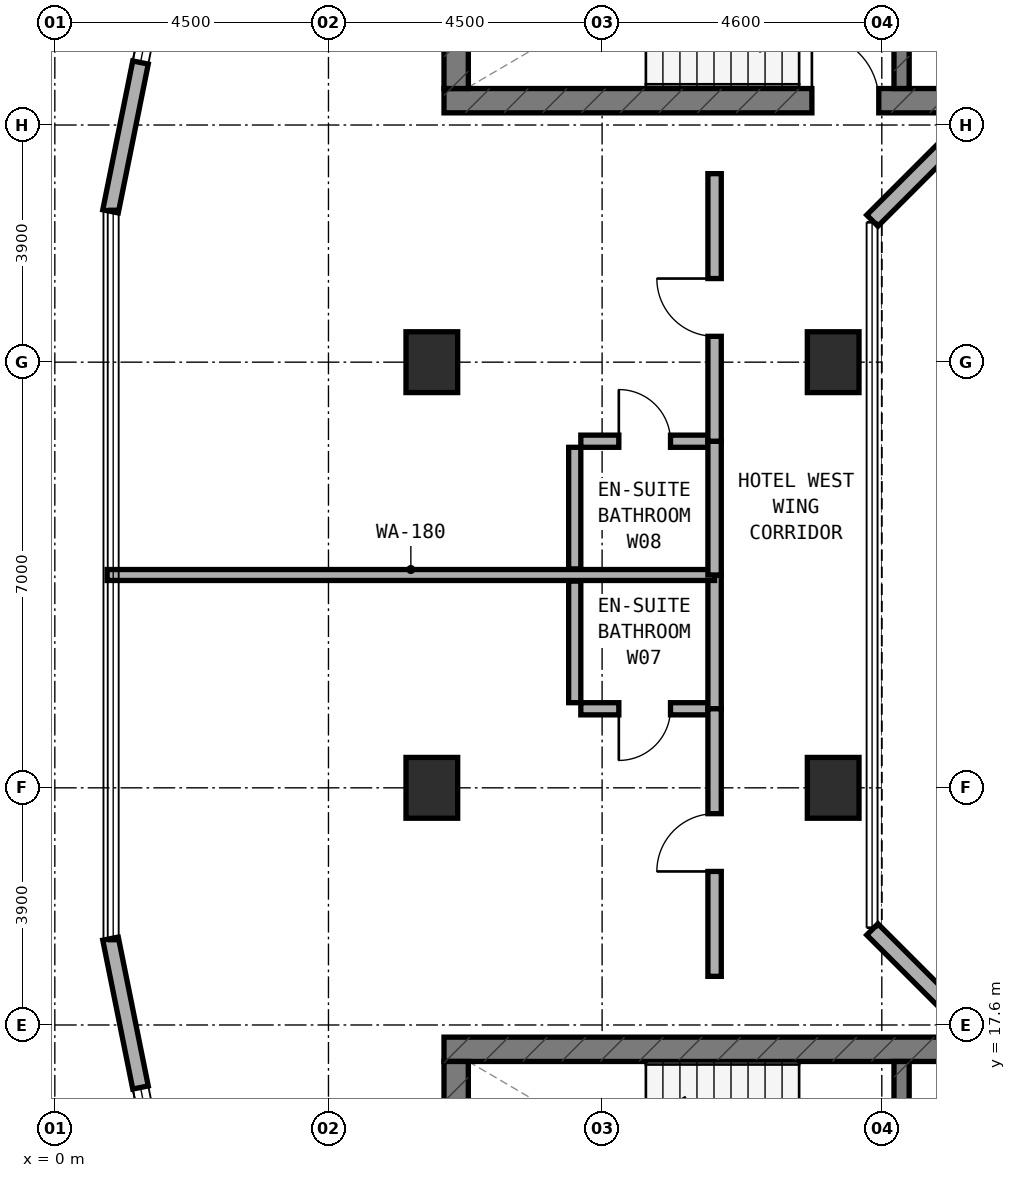
"""IFC4 building model, lengths in metres.
Left out: names, types, materials, properties, quantities, classifications, styles, units other than length and angle.
Written with IfcOpenShell. Run it as: python <this file> out.ifc"""

import sys

from ifc_helpers import new_model, si_unit, direction, frame, frame_2d, origin, origin_2d, place, context, subcontext, project, spatial, rectangle, extrude, element, fill, save


model = new_model("IFC4")
c1 = context("Model", 3, precision=1e-05, world=origin(), true_north=direction((0.0, 1.0)))
c2 = subcontext(c1, "Body", "Model", "MODEL_VIEW")
j1 = project(units=[si_unit("LENGTHUNIT", "METRE"), si_unit("PLANEANGLEUNIT", "RADIAN")], contexts=[c1])
p1 = place(None, origin())
s1 = spatial("IfcSite", under=j1, at=p1, CompositionType="ELEMENT")
p2 = place(p1, origin())
s2 = spatial("IfcBuilding", under=s1, at=p2, CompositionType="ELEMENT")
p3 = place(p2, frame((0.0, 0.0, 116.0)))
s3 = spatial("IfcBuildingStorey", under=s2, at=p3, CompositionType="ELEMENT", Elevation=116.0)
p4 = place(p3, frame((6.4, 32.8, 0.0), z_axis=(0.0, 0.0, 1.0), x_axis=(1.0, 0.0, 0.0)))
e1 = element("IfcWall", 1, at=p4, inside=s3, PredefinedType="SHEAR", context=c2, shape_type="SweptSolid", body=[
    extrude(rectangle(XDim=24.4, YDim=0.4, at=frame_2d((12.2, 0.0))), origin(), (0.0, 0.0, 1.0), 3.5),
])
p5 = place(p4, frame((6.05, 0.0, 0.0)))
e2 = element("IfcOpeningElement", 2, at=p5, cuts=e1, PredefinedType="OPENING", context=c2, shape_type="SweptSolid", body=[
    extrude(rectangle(XDim=1.1, YDim=2.15, at=frame_2d((0.55, 1.075))), frame((0.0, 0.21, 0.0), z_axis=(0.0, -1.0, 0.0), x_axis=(1.0, 0.0, 0.0)), (0.0, 0.0, 1.0), 0.42),
])
p6 = place(p3, frame((6.6, 33.0, 0.0), z_axis=(0.0, 0.0, 1.0), x_axis=(0.0, 1.0, 0.0)))
e3 = element("IfcWall", 3, at=p6, inside=s3, PredefinedType="SHEAR", context=c2, shape_type="SweptSolid", body=[
    extrude(rectangle(XDim=3.16, YDim=0.4, at=frame_2d((1.58, 0.0))), origin(), (0.0, 0.0, 1.0), 3.5),
])
p7 = place(p3, frame((13.925, 33.0, 0.0), z_axis=(0.0, 0.0, 1.0), x_axis=(0.0, 1.0, 0.0)))
e4 = element("IfcWall", 4, at=p7, inside=s3, PredefinedType="STANDARD", context=c2, shape_type="SweptSolid", body=[
    extrude(rectangle(XDim=3.16, YDim=0.25, at=frame_2d((1.58, 0.0))), origin(), (0.0, 0.0, 1.0), 3.18),
])
p8 = place(p7, frame((0.98, 0.0, 0.0)))
e5 = element("IfcOpeningElement", 5, at=p8, cuts=e4, PredefinedType="OPENING", context=c2, shape_type="SweptSolid", body=[
    extrude(rectangle(XDim=1.1, YDim=2.15, at=frame_2d((0.55, 1.075))), frame((0.0, 0.135, 0.0), z_axis=(0.0, -1.0, 0.0), x_axis=(1.0, 0.0, 0.0)), (0.0, 0.0, 1.0), 0.27),
])
p9 = place(p3, frame((6.4, 17.2, 0.0), z_axis=(0.0, 0.0, 1.0), x_axis=(1.0, 0.0, 0.0)))
e6 = element("IfcWall", 6, at=p9, inside=s3, PredefinedType="SHEAR", context=c2, shape_type="SweptSolid", body=[
    extrude(rectangle(XDim=24.4, YDim=0.4, at=frame_2d((12.2, 0.0))), origin(), (0.0, 0.0, 1.0), 3.5),
])
p10 = place(p3, frame((6.6, 13.84, 0.0), z_axis=(0.0, 0.0, 1.0), x_axis=(0.0, 1.0, 0.0)))
e7 = element("IfcWall", 7, at=p10, inside=s3, PredefinedType="SHEAR", context=c2, shape_type="SweptSolid", body=[
    extrude(rectangle(XDim=3.16, YDim=0.4, at=frame_2d((1.58, 0.0))), origin(), (0.0, 0.0, 1.0), 3.5),
])
p11 = place(p3, frame((13.925, 13.84, 0.0), z_axis=(0.0, 0.0, 1.0), x_axis=(0.0, 1.0, 0.0)))
e8 = element("IfcWall", 8, at=p11, inside=s3, PredefinedType="STANDARD", context=c2, shape_type="SweptSolid", body=[
    extrude(rectangle(XDim=3.16, YDim=0.25, at=frame_2d((1.58, 0.0))), origin(), (0.0, 0.0, 1.0), 3.18),
])
p12 = place(p11, frame((0.98, 0.0, 0.0)))
e9 = element("IfcOpeningElement", 9, at=p12, cuts=e8, PredefinedType="OPENING", context=c2, shape_type="SweptSolid", body=[
    extrude(rectangle(XDim=1.1, YDim=2.15, at=frame_2d((0.55, 1.075))), frame((0.0, 0.135, 0.0), z_axis=(0.0, -1.0, 0.0), x_axis=(1.0, 0.0, 0.0)), (0.0, 0.0, 1.0), 0.27),
])
for number, where, z_axis, x_axis in (
    (10, (6.2, 21.5, 0.0), (0.0, 0.0, 1.0), (1.0, 0.0, 0.0)),
    (11, (6.2, 28.5, 0.0), (0.0, 0.0, 1.0), (1.0, 0.0, 0.0)),
    (12, (12.8, 21.5, 0.0), (0.0, 0.0, 1.0), (1.0, 0.0, 0.0)),
    (13, (12.8, 28.5, 0.0), (0.0, 0.0, 1.0), (1.0, 0.0, 0.0)),
):
    element("IfcColumn", number, at=place(p3, frame(where, z_axis=z_axis, x_axis=x_axis)), inside=s3, PredefinedType="COLUMN", context=c2, shape_type="SweptSolid", body=[
        extrude(rectangle(XDim=0.85, YDim=1.0, at=origin_2d()), origin(), (0.0, 0.0, 1.0), 3.5),
    ])
p13 = place(p3, frame((2.729, 39.982, 0.0), z_axis=(0.0, 0.0, 1.0), x_axis=(-0.197435082048, -0.980315963543, 0.0)))
e14 = element("IfcWall", 14, at=p13, inside=s3, PredefinedType="STANDARD", context=c2, shape_type="SweptSolid", body=[
    extrude(rectangle(XDim=9.183, YDim=0.26, at=frame_2d((4.591, 0.0))), origin(), (0.0, 0.0, 1.0), 3.18),
])
p14 = place(p13, frame((4.286, 0.0, 0.8)))
e15 = element("IfcOpeningElement", 15, at=p14, cuts=e14, PredefinedType="OPENING", context=c2, shape_type="SweptSolid", body=[
    extrude(rectangle(XDim=2.4, YDim=1.6, at=frame_2d((1.2, 0.8))), frame((0.0, 0.14, 0.0), z_axis=(0.0, -1.0, 0.0), x_axis=(1.0, 0.0, 0.0)), (0.0, 0.0, 1.0), 0.28),
])
p15 = place(p3, frame((0.916, 19.02, 0.0), z_axis=(0.0, 0.0, 1.0), x_axis=(0.197435082048, -0.980315963543, 0.0)))
e16 = element("IfcWall", 16, at=p15, inside=s3, PredefinedType="STANDARD", context=c2, shape_type="SweptSolid", body=[
    extrude(rectangle(XDim=9.183, YDim=0.26, at=frame_2d((4.591, 0.0))), origin(), (0.0, 0.0, 1.0), 3.18),
])
p16 = place(p15, frame((2.497, 0.0, 0.8)))
e17 = element("IfcOpeningElement", 17, at=p16, cuts=e16, PredefinedType="OPENING", context=c2, shape_type="SweptSolid", body=[
    extrude(rectangle(XDim=2.4, YDim=1.6, at=frame_2d((1.2, 0.8))), frame((0.0, 0.14, 0.0), z_axis=(0.0, -1.0, 0.0), x_axis=(1.0, 0.0, 0.0)), (0.0, 0.0, 1.0), 0.28),
])
for number, where, z_axis, x_axis in (
    (18, (15.278, 32.662, 0.0), (0.0, 0.0, 1.0), (-0.707, -0.707, 0.0)),
    (19, (13.444, 19.172, 0.0), (0.0, 0.0, 1.0), (0.707, -0.707, 0.0)),
):
    element("IfcWall", number, at=place(p3, frame(where, z_axis=z_axis, x_axis=x_axis)), inside=s3, PredefinedType="STANDARD", context=c2, shape_type="SweptSolid", body=[
        extrude(rectangle(XDim=2.594, YDim=0.26, at=frame_2d((1.297, 0.0))), origin(), (0.0, 0.0, 1.0), 3.18),
    ])
p17 = place(p3, frame((8.65, 22.8, 0.0), z_axis=(0.0, 0.0, 1.0), x_axis=(1.0, 0.0, 0.0)))
e20 = element("IfcWall", 20, at=p17, inside=s3, PredefinedType="PLUMBINGWALL", context=c2, shape_type="SweptSolid", body=[
    extrude(rectangle(XDim=2.1, YDim=0.2, at=frame_2d((1.05, 0.0))), origin(), (0.0, 0.0, 1.0), 3.18),
])
p18 = place(p17, frame((0.625, 0.0, 0.0)))
e21 = element("IfcOpeningElement", 21, at=p18, cuts=e20, PredefinedType="OPENING", context=c2, shape_type="SweptSolid", body=[
    extrude(rectangle(XDim=0.85, YDim=2.1, at=frame_2d((0.425, 1.05))), frame((0.0, 0.11, 0.0), z_axis=(0.0, -1.0, 0.0), x_axis=(1.0, 0.0, 0.0)), (0.0, 0.0, 1.0), 0.22),
])
p19 = place(p3, frame((8.55, 22.9, 0.0), z_axis=(0.0, 0.0, 1.0), x_axis=(0.0, 1.0, 0.0)))
e22 = element("IfcWall", 22, at=p19, inside=s3, PredefinedType="PLUMBINGWALL", context=c2, shape_type="SweptSolid", body=[
    extrude(rectangle(XDim=2.0, YDim=0.2, at=frame_2d((1.0, 0.0))), origin(), (0.0, 0.0, 1.0), 3.18),
])
p20 = place(p3, frame((10.85, 22.8, 0.0), z_axis=(0.0, 0.0, 1.0), x_axis=(0.0, 1.0, 0.0)))
e23 = element("IfcWall", 23, at=p20, inside=s3, PredefinedType="SOLIDWALL", context=c2, shape_type="SweptSolid", body=[
    extrude(rectangle(XDim=2.2, YDim=0.22, at=frame_2d((1.1, 0.0))), origin(), (0.0, 0.0, 1.0), 3.18),
])
p21 = place(p3, frame((10.85, 18.4, 0.0), z_axis=(0.0, 0.0, 1.0), x_axis=(0.0, 1.0, 0.0)))
e24 = element("IfcWall", 24, at=p21, inside=s3, PredefinedType="SOLIDWALL", context=c2, shape_type="SweptSolid", body=[
    extrude(rectangle(XDim=4.4, YDim=0.22, at=frame_2d((2.2, 0.0))), origin(), (0.0, 0.0, 1.0), 2.655),
])
p22 = place(p21, frame((1.725, 0.0, 0.0)))
e25 = element("IfcOpeningElement", 25, at=p22, cuts=e24, PredefinedType="OPENING", context=c2, shape_type="SweptSolid", body=[
    extrude(rectangle(XDim=0.95, YDim=2.1, at=frame_2d((0.475, 1.05))), frame((0.0, 0.12, 0.0), z_axis=(0.0, -1.0, 0.0), x_axis=(1.0, 0.0, 0.0)), (0.0, 0.0, 1.0), 0.24),
])
p23 = place(p3, frame((0.86, 25.0, 0.0), z_axis=(0.0, 0.0, 1.0), x_axis=(1.0, 0.0, 0.0)))
e26 = element("IfcWall", 26, at=p23, inside=s3, PredefinedType="SOLIDWALL", context=c2, shape_type="SweptSolid", body=[
    extrude(rectangle(XDim=9.99, YDim=0.18, at=frame_2d((4.995, 0.0))), origin(), (0.0, 0.0, 1.0), 2.795),
])
p24 = place(p3, frame((8.65, 27.2, 0.0), z_axis=(0.0, 0.0, 1.0), x_axis=(1.0, 0.0, 0.0)))
e27 = element("IfcWall", 27, at=p24, inside=s3, PredefinedType="PLUMBINGWALL", context=c2, shape_type="SweptSolid", body=[
    extrude(rectangle(XDim=2.1, YDim=0.2, at=frame_2d((1.05, 0.0))), origin(), (0.0, 0.0, 1.0), 3.18),
])
p25 = place(p24, frame((0.625, 0.0, 0.0)))
e28 = element("IfcOpeningElement", 28, at=p25, cuts=e27, PredefinedType="OPENING", context=c2, shape_type="SweptSolid", body=[
    extrude(rectangle(XDim=0.85, YDim=2.1, at=frame_2d((0.425, 1.05))), frame((0.0, 0.11, 0.0), z_axis=(0.0, -1.0, 0.0), x_axis=(1.0, 0.0, 0.0)), (0.0, 0.0, 1.0), 0.22),
])
p26 = place(p3, frame((8.55, 25.1, 0.0), z_axis=(0.0, 0.0, 1.0), x_axis=(0.0, 1.0, 0.0)))
e29 = element("IfcWall", 29, at=p26, inside=s3, PredefinedType="PLUMBINGWALL", context=c2, shape_type="SweptSolid", body=[
    extrude(rectangle(XDim=2.0, YDim=0.2, at=frame_2d((1.0, 0.0))), origin(), (0.0, 0.0, 1.0), 3.18),
])
p27 = place(p3, frame((10.85, 25.0, 0.0), z_axis=(0.0, 0.0, 1.0), x_axis=(0.0, 1.0, 0.0)))
e30 = element("IfcWall", 30, at=p27, inside=s3, PredefinedType="SOLIDWALL", context=c2, shape_type="SweptSolid", body=[
    extrude(rectangle(XDim=2.2, YDim=0.22, at=frame_2d((1.1, 0.0))), origin(), (0.0, 0.0, 1.0), 3.18),
])
p28 = place(p3, frame((10.85, 27.2, 0.0), z_axis=(0.0, 0.0, 1.0), x_axis=(0.0, 1.0, 0.0)))
e31 = element("IfcWall", 31, at=p28, inside=s3, PredefinedType="SOLIDWALL", context=c2, shape_type="SweptSolid", body=[
    extrude(rectangle(XDim=4.4, YDim=0.22, at=frame_2d((2.2, 0.0))), origin(), (0.0, 0.0, 1.0), 2.655),
])
p29 = place(p28, frame((1.725, 0.0, 0.0)))
e32 = element("IfcOpeningElement", 32, at=p29, cuts=e31, PredefinedType="OPENING", context=c2, shape_type="SweptSolid", body=[
    extrude(rectangle(XDim=0.95, YDim=2.1, at=frame_2d((0.475, 1.05))), frame((0.0, 0.12, 0.0), z_axis=(0.0, -1.0, 0.0), x_axis=(1.0, 0.0, 0.0)), (0.0, 0.0, 1.0), 0.24),
])
p30 = place(p14, origin())
e33 = element("IfcWindow", 33, at=p30, inside=s3, PartitioningType="SINGLE_PANEL", PredefinedType="WINDOW", context=c2, shape_type="SweptSolid", body=[
    extrude(rectangle(XDim=2.4, YDim=1.6, at=frame_2d((1.2, 0.8))), frame((0.0, 0.03, 0.0), z_axis=(0.0, -1.0, 0.0), x_axis=(1.0, 0.0, 0.0)), (0.0, 0.0, 1.0), 0.06),
])
fill(e15, e33)
p31 = place(p16, origin())
e34 = element("IfcWindow", 34, at=p31, inside=s3, PartitioningType="SINGLE_PANEL", PredefinedType="WINDOW", context=c2, shape_type="SweptSolid", body=[
    extrude(rectangle(XDim=2.4, YDim=1.6, at=frame_2d((1.2, 0.8))), frame((0.0, 0.03, 0.0), z_axis=(0.0, -1.0, 0.0), x_axis=(1.0, 0.0, 0.0)), (0.0, 0.0, 1.0), 0.06),
])
fill(e17, e34)
p32 = place(p5, origin())
e35 = element("IfcDoor", 35, at=p32, inside=s3, OperationType="SINGLE_SWING_LEFT", PredefinedType="DOOR", context=c2, shape_type="SweptSolid", body=[
    extrude(rectangle(XDim=1.1, YDim=2.15, at=frame_2d((0.55, 1.075))), frame((0.0, 0.025, 0.0), z_axis=(0.0, -1.0, 0.0), x_axis=(1.0, 0.0, 0.0)), (0.0, 0.0, 1.0), 0.05),
])
fill(e2, e35)
p33 = place(p18, frame((0.85, 0.0, 0.0), z_axis=(0.0, 0.0, 1.0), x_axis=(-1.0, 0.0, 0.0)))
e36 = element("IfcDoor", 36, at=p33, inside=s3, OperationType="SINGLE_SWING_RIGHT", PredefinedType="DOOR", context=c2, shape_type="SweptSolid", body=[
    extrude(rectangle(XDim=0.85, YDim=2.1, at=frame_2d((0.425, 1.05))), frame((0.0, 0.025, 0.0), z_axis=(0.0, -1.0, 0.0), x_axis=(1.0, 0.0, 0.0)), (0.0, 0.0, 1.0), 0.05),
])
fill(e21, e36)
p34 = place(p22, origin())
e37 = element("IfcDoor", 37, at=p34, inside=s3, OperationType="SINGLE_SWING_LEFT", PredefinedType="DOOR", context=c2, shape_type="SweptSolid", body=[
    extrude(rectangle(XDim=0.95, YDim=2.1, at=frame_2d((0.475, 1.05))), frame((0.0, 0.025, 0.0), z_axis=(0.0, -1.0, 0.0), x_axis=(1.0, 0.0, 0.0)), (0.0, 0.0, 1.0), 0.05),
])
fill(e25, e37)
p35 = place(p25, origin())
e38 = element("IfcDoor", 38, at=p35, inside=s3, OperationType="SINGLE_SWING_LEFT", PredefinedType="DOOR", context=c2, shape_type="SweptSolid", body=[
    extrude(rectangle(XDim=0.85, YDim=2.1, at=frame_2d((0.425, 1.05))), frame((0.0, 0.025, 0.0), z_axis=(0.0, -1.0, 0.0), x_axis=(1.0, 0.0, 0.0)), (0.0, 0.0, 1.0), 0.05),
])
fill(e28, e38)
p36 = place(p29, origin())
e39 = element("IfcDoor", 39, at=p36, inside=s3, OperationType="SINGLE_SWING_RIGHT", PredefinedType="DOOR", context=c2, shape_type="SweptSolid", body=[
    extrude(rectangle(XDim=0.95, YDim=2.1, at=frame_2d((0.475, 1.05))), frame((0.0, 0.025, 0.0), z_axis=(0.0, -1.0, 0.0), x_axis=(1.0, 0.0, 0.0)), (0.0, 0.0, 1.0), 0.05),
])
fill(e32, e39)
save(model, sys.argv[1])
